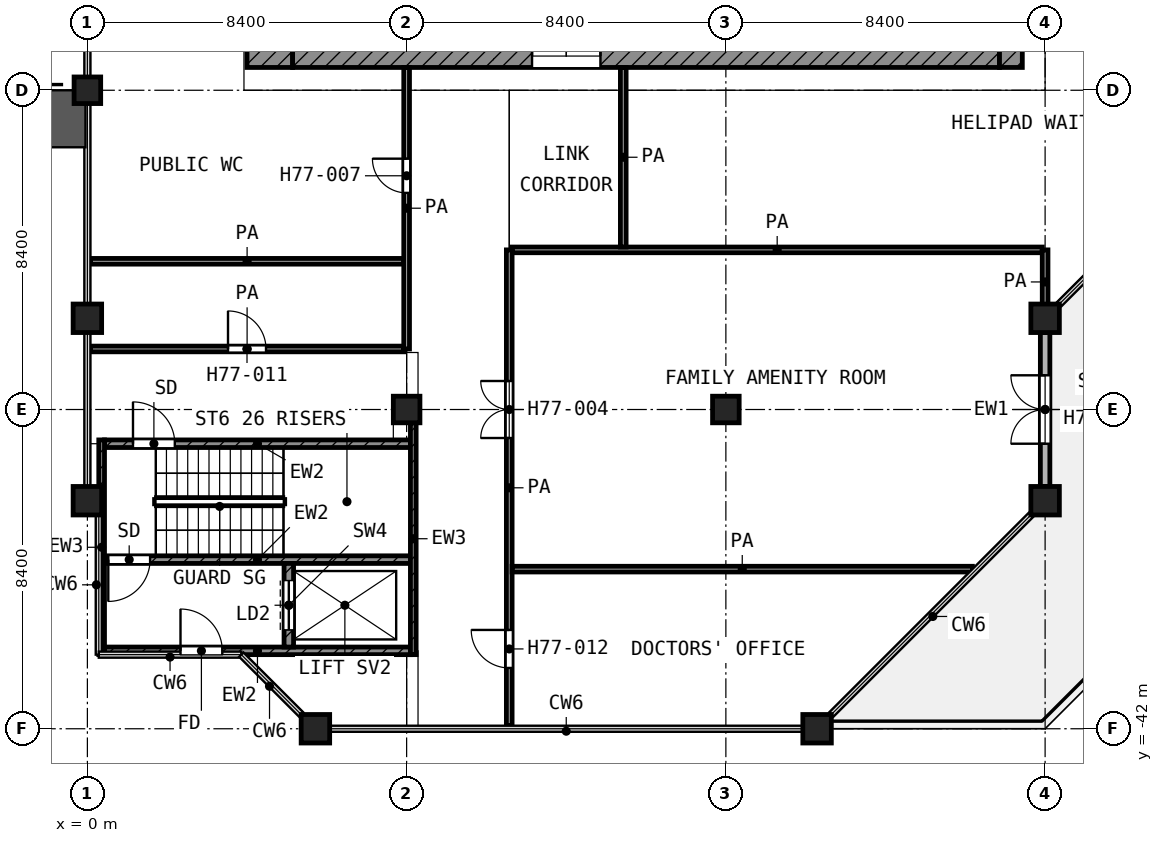
"""IFC4 building model, lengths in metres.
Left out: names, types, materials, properties, quantities, classifications, styles, units other than length and angle.
Written with IfcOpenShell. Run it as: python <this file> out.ifc"""

import sys

from ifc_helpers import new_model, si_unit, direction, frame, frame_2d, origin, origin_2d, place, context, subcontext, project, spatial, rectangle, extrude, element, fill, save


model = new_model("IFC4")
c1 = context("Model", 3, precision=1e-05, world=origin(), true_north=direction((0.0, 1.0)))
c2 = subcontext(c1, "Body", "Model", "MODEL_VIEW")
j1 = project(units=[si_unit("LENGTHUNIT", "METRE"), si_unit("PLANEANGLEUNIT", "RADIAN")], contexts=[c1])
p1 = place(None, origin())
s1 = spatial("IfcSite", under=j1, at=p1, CompositionType="ELEMENT")
p2 = place(p1, origin())
s2 = spatial("IfcBuilding", under=s1, at=p2, CompositionType="ELEMENT")
p3 = place(p2, frame((0.0, 0.0, 332.2)))
s3 = spatial("IfcBuildingStorey", under=s2, at=p3, CompositionType="ELEMENT", Elevation=332.2)
p4 = place(p3, frame((0.0, -25.2, 0.0), z_axis=(0.0, 0.0, 1.0), x_axis=(1.0, 0.0, 0.0)))
e1 = element("IfcColumn", 1, at=p4, inside=s3, PredefinedType="COLUMN", context=c2, shape_type="SweptSolid", body=[
    extrude(rectangle(XDim=0.7, YDim=0.7, at=origin_2d()), origin(), (0.0, 0.0, 1.0), 4.5),
])
p5 = place(p3, frame((25.2, -31.2, 0.0), z_axis=(0.0, 0.0, 1.0), x_axis=(1.0, 0.0, 0.0)))
e2 = element("IfcColumn", 2, at=p5, inside=s3, PredefinedType="COLUMN", context=c2, shape_type="SweptSolid", body=[
    extrude(rectangle(XDim=0.75, YDim=0.75, at=origin_2d()), origin(), (0.0, 0.0, 1.0), 4.5),
])
for number, where, z_axis, x_axis in (
    (3, (8.4, -33.6, 0.0), (0.0, 0.0, 1.0), (1.0, 0.0, 0.0)),
    (4, (16.8, -33.6, 0.0), (0.0, 0.0, 1.0), (1.0, 0.0, 0.0)),
):
    element("IfcColumn", number, at=place(p3, frame(where, z_axis=z_axis, x_axis=x_axis)), inside=s3, PredefinedType="COLUMN", context=c2, shape_type="SweptSolid", body=[
        extrude(rectangle(XDim=0.7, YDim=0.7, at=origin_2d()), origin(), (0.0, 0.0, 1.0), 4.5),
    ])
for number, where, z_axis, x_axis in (
    (5, (0.0, -36.0, 0.0), (0.0, 0.0, 1.0), (1.0, 0.0, 0.0)),
    (6, (25.2, -36.0, 0.0), (0.0, 0.0, 1.0), (1.0, 0.0, 0.0)),
    (7, (6.0, -42.0, 0.0), (0.0, 0.0, 1.0), (1.0, 0.0, 0.0)),
    (8, (19.2, -42.0, 0.0), (0.0, 0.0, 1.0), (1.0, 0.0, 0.0)),
    (9, (0.0, -31.2, 0.0), (0.0, 0.0, 1.0), (1.0, 0.0, 0.0)),
):
    element("IfcColumn", number, at=place(p3, frame(where, z_axis=z_axis, x_axis=x_axis)), inside=s3, PredefinedType="COLUMN", context=c2, shape_type="SweptSolid", body=[
        extrude(rectangle(XDim=0.75, YDim=0.75, at=origin_2d()), origin(), (0.0, 0.0, 1.0), 4.5),
    ])
p6 = place(p3, frame((25.2, -35.625, 0.0), z_axis=(0.0, 0.0, 1.0), x_axis=(0.0, 1.0, 0.0)))
e10 = element("IfcWall", 10, at=p6, inside=s3, PredefinedType="SOLIDWALL", context=c2, shape_type="SweptSolid", body=[
    extrude(rectangle(XDim=4.05, YDim=0.25, at=frame_2d((2.025, 0.0))), origin(), (0.0, 0.0, 1.0), 3.79),
])
p7 = place(p6, frame((1.125, 0.0, 0.0)))
e11 = element("IfcOpeningElement", 11, at=p7, cuts=e10, PredefinedType="OPENING", context=c2, shape_type="SweptSolid", body=[
    extrude(rectangle(XDim=1.8, YDim=2.1, at=frame_2d((0.9, 1.05))), frame((0.0, 0.135, 0.0), z_axis=(0.0, -1.0, 0.0), x_axis=(1.0, 0.0, 0.0)), (0.0, 0.0, 1.0), 0.27),
])
p8 = place(p3, frame((31.112, -25.112, 4.5), z_axis=(0.0, 0.0, 1.0), x_axis=(-0.707106781187, -0.707106781187, 0.0)))
e12 = element("IfcWall", 12, at=p8, inside=s3, PredefinedType="SOLIDWALL", context=c2, shape_type="SweptSolid", body=[
    extrude(rectangle(XDim=8.31, YDim=0.25, at=frame_2d((4.155, 0.0))), origin(), (0.0, 0.0, 1.0), 1.1),
])
p9 = place(p3, frame((0.125, -30.827, 4.5), z_axis=(0.0, 0.0, 1.0), x_axis=(0.0, 1.0, 0.0)))
e13 = element("IfcWall", 13, at=p9, inside=s3, PredefinedType="SOLIDWALL", context=c2, shape_type="SweptSolid", body=[
    extrude(rectangle(XDim=5.452, YDim=0.25, at=frame_2d((2.726, 0.0))), origin(), (0.0, 0.0, 1.0), 1.1),
])
p10 = place(p3, frame((-0.132, -25.05, 4.5), z_axis=(0.0, 0.0, 1.0), x_axis=(-1.0, 0.0, 0.0)))
e14 = element("IfcWall", 14, at=p10, inside=s3, PredefinedType="SOLIDWALL", context=c2, shape_type="SweptSolid", body=[
    extrude(rectangle(XDim=0.551, YDim=0.25, at=frame_2d((0.275, 0.0))), origin(), (0.0, 0.0, 1.0), 1.1),
])
p11 = place(p3, frame((4.8, -24.6, 0.0), z_axis=(0.0, 0.0, 1.0), x_axis=(0.0, 1.0, 0.0)))
e15 = element("IfcWall", 15, at=p11, inside=s3, PredefinedType="SHEAR", context=c2, shape_type="SweptSolid", body=[
    extrude(rectangle(XDim=19.2, YDim=1.2, at=frame_2d((9.6, 0.0))), origin(), (0.0, 0.0, 1.0), 3.95),
])
p12 = place(p11, frame((11.05, 0.0, 0.0)))
e16 = element("IfcOpeningElement", 16, at=p12, cuts=e15, PredefinedType="OPENING", context=c2, shape_type="SweptSolid", body=[
    extrude(rectangle(XDim=1.1, YDim=2.1, at=frame_2d((0.55, 1.05))), frame((0.0, 0.61, 0.0), z_axis=(0.0, -1.0, 0.0), x_axis=(1.0, 0.0, 0.0)), (0.0, 0.0, 1.0), 1.22),
])
p13 = place(p11, frame((1.75, 0.0, 0.0)))
e17 = element("IfcOpeningElement", 17, at=p13, cuts=e15, PredefinedType="OPENING", context=c2, shape_type="SweptSolid", body=[
    extrude(rectangle(XDim=1.1, YDim=2.1, at=frame_2d((0.55, 1.05))), frame((0.0, 0.61, 0.0), z_axis=(0.0, -1.0, 0.0), x_axis=(1.0, 0.0, 0.0)), (0.0, 0.0, 1.0), 1.22),
])
p14 = place(p3, frame((5.4, -24.3, 0.0), z_axis=(0.0, 0.0, 1.0), x_axis=(1.0, 0.0, 0.0)))
e18 = element("IfcWall", 18, at=p14, inside=s3, PredefinedType="SHEAR", context=c2, shape_type="SweptSolid", body=[
    extrude(rectangle(XDim=18.6, YDim=0.6, at=frame_2d((9.3, 0.0))), origin(), (0.0, 0.0, 1.0), 3.95),
])
p15 = place(p14, frame((6.3, 0.0, 0.0)))
e19 = element("IfcOpeningElement", 19, at=p15, cuts=e18, PredefinedType="OPENING", context=c2, shape_type="SweptSolid", body=[
    extrude(rectangle(XDim=1.8, YDim=2.1, at=frame_2d((0.9, 1.05))), frame((0.0, 0.31, 0.0), z_axis=(0.0, -1.0, 0.0), x_axis=(1.0, 0.0, 0.0)), (0.0, 0.0, 1.0), 0.62),
])
p16 = place(p3, frame((24.3, -24.6, 0.0), z_axis=(0.0, 0.0, 1.0), x_axis=(0.0, 1.0, 0.0)))
e20 = element("IfcWall", 20, at=p16, inside=s3, PredefinedType="SHEAR", context=c2, shape_type="SweptSolid", body=[
    extrude(rectangle(XDim=0.6, YDim=0.6, at=frame_2d((0.3, 0.0))), origin(), (0.0, 0.0, 1.0), 3.95),
])
p17 = place(p3, frame((0.375, -40.05, 0.0), z_axis=(0.0, 0.0, 1.0), x_axis=(0.0, 1.0, 0.0)))
e21 = element("IfcWall", 21, at=p17, inside=s3, PredefinedType="SHEAR", context=c2, shape_type="SweptSolid", body=[
    extrude(rectangle(XDim=5.65, YDim=0.15, at=frame_2d((2.825, 0.0))), origin(), (0.0, 0.0, 1.0), 3.95),
])
p18 = place(p3, frame((8.575, -40.05, 0.0), z_axis=(0.0, 0.0, 1.0), x_axis=(0.0, 1.0, 0.0)))
e22 = element("IfcWall", 22, at=p18, inside=s3, PredefinedType="SHEAR", context=c2, shape_type="SweptSolid", body=[
    extrude(rectangle(XDim=6.1, YDim=0.15, at=frame_2d((3.05, 0.0))), origin(), (0.0, 0.0, 1.0), 3.95),
])
p19 = place(p3, frame((0.45, -34.5, 0.0), z_axis=(0.0, 0.0, 1.0), x_axis=(1.0, 0.0, 0.0)))
e23 = element("IfcWall", 23, at=p19, inside=s3, PredefinedType="SHEAR", context=c2, shape_type="SweptSolid", body=[
    extrude(rectangle(XDim=8.05, YDim=0.2, at=frame_2d((4.025, 0.0))), origin(), (0.0, 0.0, 1.0), 3.95),
])
p20 = place(p19, frame((0.75, 0.0, 0.0)))
e24 = element("IfcOpeningElement", 24, at=p20, cuts=e23, PredefinedType="OPENING", context=c2, shape_type="SweptSolid", body=[
    extrude(rectangle(XDim=1.1, YDim=2.1, at=frame_2d((0.55, 1.05))), frame((0.0, 0.11, 0.0), z_axis=(0.0, -1.0, 0.0), x_axis=(1.0, 0.0, 0.0)), (0.0, 0.0, 1.0), 0.22),
])
p21 = place(p3, frame((0.45, -37.55, 0.0), z_axis=(0.0, 0.0, 1.0), x_axis=(1.0, 0.0, 0.0)))
e25 = element("IfcWall", 25, at=p21, inside=s3, PredefinedType="SHEAR", context=c2, shape_type="SweptSolid", body=[
    extrude(rectangle(XDim=8.05, YDim=0.2, at=frame_2d((4.025, 0.0))), origin(), (0.0, 0.0, 1.0), 3.95),
])
p22 = place(p21, frame((0.1, 0.0, 0.0)))
e26 = element("IfcOpeningElement", 26, at=p22, cuts=e25, PredefinedType="OPENING", context=c2, shape_type="SweptSolid", body=[
    extrude(rectangle(XDim=1.1, YDim=2.1, at=frame_2d((0.55, 1.05))), frame((0.0, 0.11, 0.0), z_axis=(0.0, -1.0, 0.0), x_axis=(1.0, 0.0, 0.0)), (0.0, 0.0, 1.0), 0.22),
])
p23 = place(p3, frame((0.45, -39.95, 0.0), z_axis=(0.0, 0.0, 1.0), x_axis=(1.0, 0.0, 0.0)))
e27 = element("IfcWall", 27, at=p23, inside=s3, PredefinedType="SHEAR", context=c2, shape_type="SweptSolid", body=[
    extrude(rectangle(XDim=8.05, YDim=0.2, at=frame_2d((4.025, 0.0))), origin(), (0.0, 0.0, 1.0), 3.95),
])
p24 = place(p23, frame((2.0, 0.0, 0.0)))
e28 = element("IfcOpeningElement", 28, at=p24, cuts=e27, PredefinedType="OPENING", context=c2, shape_type="SweptSolid", body=[
    extrude(rectangle(XDim=1.1, YDim=2.1, at=frame_2d((0.55, 1.05))), frame((0.0, 0.11, 0.0), z_axis=(0.0, -1.0, 0.0), x_axis=(1.0, 0.0, 0.0)), (0.0, 0.0, 1.0), 0.22),
])
p25 = place(p3, frame((5.3, -39.85, 0.0), z_axis=(0.0, 0.0, 1.0), x_axis=(0.0, 1.0, 0.0)))
e29 = element("IfcWall", 29, at=p25, inside=s3, PredefinedType="SHEAR", context=c2, shape_type="SweptSolid", body=[
    extrude(rectangle(XDim=2.2, YDim=0.25, at=frame_2d((1.1, 0.0))), origin(), (0.0, 0.0, 1.0), 3.95),
])
p26 = place(p25, frame((0.45, 0.0, 0.0)))
e30 = element("IfcOpeningElement", 30, at=p26, cuts=e29, PredefinedType="OPENING", context=c2, shape_type="SweptSolid", body=[
    extrude(rectangle(XDim=1.3, YDim=2.1, at=frame_2d((0.65, 1.05))), frame((0.0, 0.135, 0.0), z_axis=(0.0, -1.0, 0.0), x_axis=(1.0, 0.0, 0.0)), (0.0, 0.0, 1.0), 0.27),
])
p27 = place(p3, frame((11.175, -37.8, 0.0), z_axis=(0.0, 0.0, 1.0), x_axis=(1.0, 0.0, 0.0)))
e31 = element("IfcWall", 31, at=p27, inside=s3, PredefinedType="PARTITIONING", context=c2, shape_type="SweptSolid", body=[
    extrude(rectangle(XDim=12.112, YDim=0.15, at=frame_2d((6.056, 0.0))), origin(), (0.0, 0.0, 1.0), 3.95),
])
p28 = place(p3, frame((0.08, -32.007, 0.0), z_axis=(0.0, 0.0, 1.0), x_axis=(1.0, 0.0, 0.0)))
e32 = element("IfcWall", 32, at=p28, inside=s3, PredefinedType="PARTITIONING", context=c2, shape_type="SweptSolid", body=[
    extrude(rectangle(XDim=8.245, YDim=0.15, at=frame_2d((4.123, 0.0))), origin(), (0.0, 0.0, 1.0), 3.95),
])
p29 = place(p28, frame((3.62, 0.0, 0.0)))
e33 = element("IfcOpeningElement", 33, at=p29, cuts=e32, PredefinedType="OPENING", context=c2, shape_type="SweptSolid", body=[
    extrude(rectangle(XDim=1.0, YDim=2.1, at=frame_2d((0.5, 1.05))), frame((0.0, 0.085, 0.0), z_axis=(0.0, -1.0, 0.0), x_axis=(1.0, 0.0, 0.0)), (0.0, 0.0, 1.0), 0.17),
])
p30 = place(p3, frame((0.08, -29.7, 0.0), z_axis=(0.0, 0.0, 1.0), x_axis=(1.0, 0.0, 0.0)))
e34 = element("IfcWall", 34, at=p30, inside=s3, PredefinedType="PARTITIONING", context=c2, shape_type="SweptSolid", body=[
    extrude(rectangle(XDim=8.245, YDim=0.15, at=frame_2d((4.123, 0.0))), origin(), (0.0, 0.0, 1.0), 3.95),
])
p31 = place(p3, frame((11.175, -29.4, 0.0), z_axis=(0.0, 0.0, 1.0), x_axis=(1.0, 0.0, 0.0)))
e35 = element("IfcWall", 35, at=p31, inside=s3, PredefinedType="PARTITIONING", context=c2, shape_type="SweptSolid", body=[
    extrude(rectangle(XDim=13.95, YDim=0.15, at=frame_2d((6.975, 0.0))), origin(), (0.0, 0.0, 1.0), 3.95),
])
p32 = place(p3, frame((8.4, -32.007, 0.0), z_axis=(0.0, 0.0, 1.0), x_axis=(0.0, 1.0, 0.0)))
e36 = element("IfcWall", 36, at=p32, inside=s3, PredefinedType="PARTITIONING", context=c2, shape_type="SweptSolid", body=[
    extrude(rectangle(XDim=7.407, YDim=0.15, at=frame_2d((3.704, 0.0))), origin(), (0.0, 0.0, 1.0), 3.95),
])
p33 = place(p32, frame((4.107, 0.0, 0.0)))
e37 = element("IfcOpeningElement", 37, at=p33, cuts=e36, PredefinedType="OPENING", context=c2, shape_type="SweptSolid", body=[
    extrude(rectangle(XDim=0.9, YDim=2.1, at=frame_2d((0.45, 1.05))), frame((0.0, 0.085, 0.0), z_axis=(0.0, -1.0, 0.0), x_axis=(1.0, 0.0, 0.0)), (0.0, 0.0, 1.0), 0.17),
])
p34 = place(p3, frame((11.1, -41.92, 0.0), z_axis=(0.0, 0.0, 1.0), x_axis=(0.0, 1.0, 0.0)))
e38 = element("IfcWall", 38, at=p34, inside=s3, PredefinedType="PARTITIONING", context=c2, shape_type="SweptSolid", body=[
    extrude(rectangle(XDim=12.52, YDim=0.15, at=frame_2d((6.26, 0.0))), origin(), (0.0, 0.0, 1.0), 3.95),
])
p35 = place(p34, frame((7.57, 0.0, 0.0)))
e39 = element("IfcOpeningElement", 39, at=p35, cuts=e38, PredefinedType="OPENING", context=c2, shape_type="SweptSolid", body=[
    extrude(rectangle(XDim=1.5, YDim=2.1, at=frame_2d((0.75, 1.05))), frame((0.0, 0.085, 0.0), z_axis=(0.0, -1.0, 0.0), x_axis=(1.0, 0.0, 0.0)), (0.0, 0.0, 1.0), 0.17),
])
p36 = place(p34, frame((1.52, 0.0, 0.0)))
e40 = element("IfcOpeningElement", 40, at=p36, cuts=e38, PredefinedType="OPENING", context=c2, shape_type="SweptSolid", body=[
    extrude(rectangle(XDim=1.0, YDim=2.1, at=frame_2d((0.5, 1.05))), frame((0.0, 0.085, 0.0), z_axis=(0.0, -1.0, 0.0), x_axis=(1.0, 0.0, 0.0)), (0.0, 0.0, 1.0), 0.17),
])
p37 = place(p3, frame((14.1, -29.325, 0.0), z_axis=(0.0, 0.0, 1.0), x_axis=(0.0, 1.0, 0.0)))
e41 = element("IfcWall", 41, at=p37, inside=s3, PredefinedType="PARTITIONING", context=c2, shape_type="SweptSolid", body=[
    extrude(rectangle(XDim=4.725, YDim=0.15, at=frame_2d((2.362, 0.0))), origin(), (0.0, 0.0, 1.0), 3.95),
])
p38 = place(p3, frame((25.2, -31.087, 0.0), z_axis=(0.0, 0.0, 1.0), x_axis=(0.0, 1.0, 0.0)))
e42 = element("IfcWall", 42, at=p38, inside=s3, PredefinedType="PARTITIONING", context=c2, shape_type="SweptSolid", body=[
    extrude(rectangle(XDim=1.687, YDim=0.15, at=frame_2d((0.844, 0.0))), origin(), (0.0, 0.0, 1.0), 3.95),
])
p39 = place(p7, origin())
e43 = element("IfcDoor", 43, at=p39, inside=s3, OperationType="DOUBLE_DOOR_SINGLE_SWING", PredefinedType="DOOR", context=c2, shape_type="SweptSolid", body=[
    extrude(rectangle(XDim=1.8, YDim=2.1, at=frame_2d((0.9, 1.05))), frame((0.0, 0.025, 0.0), z_axis=(0.0, -1.0, 0.0), x_axis=(1.0, 0.0, 0.0)), (0.0, 0.0, 1.0), 0.05),
])
fill(e11, e43)
p40 = place(p15, origin())
e44 = element("IfcDoor", 44, at=p40, inside=s3, OperationType="DOUBLE_DOOR_SINGLE_SWING", PredefinedType="DOOR", context=c2, shape_type="SweptSolid", body=[
    extrude(rectangle(XDim=1.8, YDim=2.1, at=frame_2d((0.9, 1.05))), frame((0.0, 0.025, 0.0), z_axis=(0.0, -1.0, 0.0), x_axis=(1.0, 0.0, 0.0)), (0.0, 0.0, 1.0), 0.05),
])
fill(e19, e44)
p41 = place(p20, origin())
e45 = element("IfcDoor", 45, at=p41, inside=s3, OperationType="SINGLE_SWING_LEFT", PredefinedType="DOOR", context=c2, shape_type="SweptSolid", body=[
    extrude(rectangle(XDim=1.1, YDim=2.1, at=frame_2d((0.55, 1.05))), frame((0.0, 0.025, 0.0), z_axis=(0.0, -1.0, 0.0), x_axis=(1.0, 0.0, 0.0)), (0.0, 0.0, 1.0), 0.05),
])
fill(e24, e45)
p42 = place(p22, frame((1.1, 0.0, 0.0), z_axis=(0.0, 0.0, 1.0), x_axis=(-1.0, 0.0, 0.0)))
e46 = element("IfcDoor", 46, at=p42, inside=s3, OperationType="SINGLE_SWING_LEFT", PredefinedType="DOOR", context=c2, shape_type="SweptSolid", body=[
    extrude(rectangle(XDim=1.1, YDim=2.1, at=frame_2d((0.55, 1.05))), frame((0.0, 0.025, 0.0), z_axis=(0.0, -1.0, 0.0), x_axis=(1.0, 0.0, 0.0)), (0.0, 0.0, 1.0), 0.05),
])
fill(e26, e46)
p43 = place(p26, origin())
e47 = element("IfcDoor", 47, at=p43, inside=s3, OperationType="DOUBLE_DOOR_SLIDING", PredefinedType="DOOR", context=c2, shape_type="SweptSolid", body=[
    extrude(rectangle(XDim=1.3, YDim=2.1, at=frame_2d((0.65, 1.05))), frame((0.0, 0.025, 0.0), z_axis=(0.0, -1.0, 0.0), x_axis=(1.0, 0.0, 0.0)), (0.0, 0.0, 1.0), 0.05),
])
fill(e30, e47)
p44 = place(p24, origin())
e48 = element("IfcDoor", 48, at=p44, inside=s3, OperationType="SINGLE_SWING_LEFT", PredefinedType="DOOR", context=c2, shape_type="SweptSolid", body=[
    extrude(rectangle(XDim=1.1, YDim=2.1, at=frame_2d((0.55, 1.05))), frame((0.0, 0.025, 0.0), z_axis=(0.0, -1.0, 0.0), x_axis=(1.0, 0.0, 0.0)), (0.0, 0.0, 1.0), 0.05),
])
fill(e28, e48)
p45 = place(p33, origin())
e49 = element("IfcDoor", 49, at=p45, inside=s3, OperationType="SINGLE_SWING_RIGHT", PredefinedType="DOOR", context=c2, shape_type="SweptSolid", body=[
    extrude(rectangle(XDim=0.9, YDim=2.1, at=frame_2d((0.45, 1.05))), frame((0.0, 0.025, 0.0), z_axis=(0.0, -1.0, 0.0), x_axis=(1.0, 0.0, 0.0)), (0.0, 0.0, 1.0), 0.05),
])
fill(e37, e49)
p46 = place(p29, origin())
e50 = element("IfcDoor", 50, at=p46, inside=s3, OperationType="SINGLE_SWING_LEFT", PredefinedType="DOOR", context=c2, shape_type="SweptSolid", body=[
    extrude(rectangle(XDim=1.0, YDim=2.1, at=frame_2d((0.5, 1.05))), frame((0.0, 0.025, 0.0), z_axis=(0.0, -1.0, 0.0), x_axis=(1.0, 0.0, 0.0)), (0.0, 0.0, 1.0), 0.05),
])
fill(e33, e50)
p47 = place(p35, origin())
e51 = element("IfcDoor", 51, at=p47, inside=s3, OperationType="DOUBLE_DOOR_SINGLE_SWING", PredefinedType="DOOR", context=c2, shape_type="SweptSolid", body=[
    extrude(rectangle(XDim=1.5, YDim=2.1, at=frame_2d((0.75, 1.05))), frame((0.0, 0.025, 0.0), z_axis=(0.0, -1.0, 0.0), x_axis=(1.0, 0.0, 0.0)), (0.0, 0.0, 1.0), 0.05),
])
fill(e39, e51)
p48 = place(p36, origin())
e52 = element("IfcDoor", 52, at=p48, inside=s3, OperationType="SINGLE_SWING_RIGHT", PredefinedType="DOOR", context=c2, shape_type="SweptSolid", body=[
    extrude(rectangle(XDim=1.0, YDim=2.1, at=frame_2d((0.5, 1.05))), frame((0.0, 0.025, 0.0), z_axis=(0.0, -1.0, 0.0), x_axis=(1.0, 0.0, 0.0)), (0.0, 0.0, 1.0), 0.05),
])
fill(e40, e52)
save(model, sys.argv[1])
